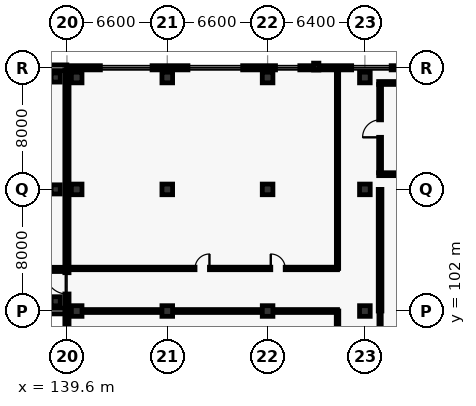
"""IFC4 building model, lengths in metres.
Left out: names, types, materials, properties, quantities, classifications, styles, units other than length and angle.
Written with IfcOpenShell. Run it as: python <this file> out.ifc"""

import sys

from ifc_helpers import new_model, si_unit, direction, frame, frame_2d, origin, origin_2d, place, context, subcontext, project, spatial, rectangle, extrude, element, fill, save


model = new_model("IFC4")
c1 = context("Model", 3, precision=1e-05, world=origin(), true_north=direction((0.0, 1.0)))
c2 = subcontext(c1, "Body", "Model", "MODEL_VIEW")
j1 = project(units=[si_unit("LENGTHUNIT", "METRE"), si_unit("PLANEANGLEUNIT", "RADIAN")], contexts=[c1])
p1 = place(None, origin())
s1 = spatial("IfcSite", under=j1, at=p1, CompositionType="ELEMENT")
p2 = place(p1, origin())
s2 = spatial("IfcBuilding", under=s1, at=p2, CompositionType="ELEMENT")
p3 = place(p2, frame((0.0, 0.0, 5.4)))
s3 = spatial("IfcBuildingStorey", under=s2, at=p3, CompositionType="ELEMENT", Elevation=5.4)
for number, where, z_axis, x_axis in (
    (1, (138.86, 102.64, 0.0), (0.0, 0.0, 1.0), (1.0, 0.0, 0.0)),
    (2, (138.86, 110.0, 0.0), (0.0, 0.0, 1.0), (1.0, 0.0, 0.0)),
    (3, (138.86, 117.36, 0.0), (0.0, 0.0, 1.0), (1.0, 0.0, 0.0)),
):
    element("IfcColumn", number, at=place(p3, frame(where, z_axis=z_axis, x_axis=x_axis)), inside=s3, PredefinedType="COLUMN", context=c2, shape_type="SweptSolid", body=[
        extrude(rectangle(XDim=0.6, YDim=0.6, at=origin_2d()), origin(), (0.0, 0.0, 1.0), 4.8),
    ])
for number, where, z_axis, x_axis in (
    (4, (140.24, 102.0, 0.0), (0.0, 0.0, 1.0), (1.0, 0.0, 0.0)),
    (5, (140.24, 110.0, 0.0), (0.0, 0.0, 1.0), (1.0, 0.0, 0.0)),
    (6, (140.24, 117.36, 0.0), (0.0, 0.0, 1.0), (1.0, 0.0, 0.0)),
    (7, (146.2, 102.0, 0.0), (0.0, 0.0, 1.0), (1.0, 0.0, 0.0)),
    (8, (146.2, 110.0, 0.0), (0.0, 0.0, 1.0), (1.0, 0.0, 0.0)),
    (9, (146.2, 117.36, 0.0), (0.0, 0.0, 1.0), (1.0, 0.0, 0.0)),
    (10, (152.8, 102.0, 0.0), (0.0, 0.0, 1.0), (1.0, 0.0, 0.0)),
    (11, (152.8, 110.0, 0.0), (0.0, 0.0, 1.0), (1.0, 0.0, 0.0)),
    (12, (152.8, 117.36, 0.0), (0.0, 0.0, 1.0), (1.0, 0.0, 0.0)),
    (13, (159.2, 102.0, 0.0), (0.0, 0.0, 1.0), (1.0, 0.0, 0.0)),
    (14, (159.2, 110.0, 0.0), (0.0, 0.0, 1.0), (1.0, 0.0, 0.0)),
    (15, (159.2, 117.36, 0.0), (0.0, 0.0, 1.0), (1.0, 0.0, 0.0)),
):
    element("IfcColumn", number, at=place(p3, frame(where, z_axis=z_axis, x_axis=x_axis)), inside=s3, PredefinedType="COLUMN", context=c2, shape_type="SweptSolid", body=[
        extrude(rectangle(XDim=0.7, YDim=0.7, at=origin_2d()), origin(), (0.0, 0.0, 1.0), 4.8),
    ])
p4 = place(p3, frame((156.0, 118.08, 0.0), z_axis=(0.0, 0.0, 1.0), x_axis=(0.0, 1.0, 0.0)))
e16 = element("IfcColumn", 16, at=p4, inside=s3, PredefinedType="PILASTER", context=c2, shape_type="SweptSolid", body=[
    extrude(rectangle(XDim=0.35, YDim=0.45, at=origin_2d()), origin(), (0.0, 0.0, 1.0), 4.8),
])
p5 = place(p3, frame((94.8, 118.0, 0.0), z_axis=(0.0, 0.0, 1.0), x_axis=(1.0, 0.0, 0.0)))
e17 = element("IfcWall", 17, at=p5, inside=s3, PredefinedType="SOLIDWALL", context=c2, shape_type="SweptSolid", body=[
    extrude(rectangle(XDim=44.795, YDim=0.38, at=frame_2d((22.397, 0.0))), origin(), (0.0, 0.0, 1.0), 4.54),
])
p6 = place(p5, frame((0.75, 0.0, 0.9)))
e18 = element("IfcOpeningElement", 18, at=p6, cuts=e17, PredefinedType="OPENING", context=c2, shape_type="SweptSolid", body=[
    extrude(rectangle(XDim=2.8, YDim=1.8, at=frame_2d((1.4, 0.9))), frame((0.0, 0.2, 0.0), z_axis=(0.0, -1.0, 0.0), x_axis=(1.0, 0.0, 0.0)), (0.0, 0.0, 1.0), 0.4),
])
p7 = place(p5, frame((8.3, 0.0, 0.9)))
e19 = element("IfcOpeningElement", 19, at=p7, cuts=e17, PredefinedType="OPENING", context=c2, shape_type="SweptSolid", body=[
    extrude(rectangle(XDim=3.0, YDim=1.8, at=frame_2d((1.5, 0.9))), frame((0.0, 0.2, 0.0), z_axis=(0.0, -1.0, 0.0), x_axis=(1.0, 0.0, 0.0)), (0.0, 0.0, 1.0), 0.4),
])
p8 = place(p5, frame((15.9, 0.0, 0.9)))
e20 = element("IfcOpeningElement", 20, at=p8, cuts=e17, PredefinedType="OPENING", context=c2, shape_type="SweptSolid", body=[
    extrude(rectangle(XDim=3.2, YDim=1.85, at=frame_2d((1.6, 0.925))), frame((0.0, 0.2, 0.0), z_axis=(0.0, -1.0, 0.0), x_axis=(1.0, 0.0, 0.0)), (0.0, 0.0, 1.0), 0.4),
])
p9 = place(p5, frame((22.75, 0.0, 0.9)))
e21 = element("IfcOpeningElement", 21, at=p9, cuts=e17, PredefinedType="OPENING", context=c2, shape_type="SweptSolid", body=[
    extrude(rectangle(XDim=3.4, YDim=1.85, at=frame_2d((1.7, 0.925))), frame((0.0, 0.2, 0.0), z_axis=(0.0, -1.0, 0.0), x_axis=(1.0, 0.0, 0.0)), (0.0, 0.0, 1.0), 0.4),
])
p10 = place(p5, frame((30.35, 0.0, 0.9)))
e22 = element("IfcOpeningElement", 22, at=p10, cuts=e17, PredefinedType="OPENING", context=c2, shape_type="SweptSolid", body=[
    extrude(rectangle(XDim=3.6, YDim=1.9, at=frame_2d((1.8, 0.95))), frame((0.0, 0.2, 0.0), z_axis=(0.0, -1.0, 0.0), x_axis=(1.0, 0.0, 0.0)), (0.0, 0.0, 1.0), 0.4),
])
p11 = place(p5, frame((36.45, 0.0, 0.9)))
e23 = element("IfcOpeningElement", 23, at=p11, cuts=e17, PredefinedType="OPENING", context=c2, shape_type="SweptSolid", body=[
    extrude(rectangle(XDim=3.8, YDim=1.9, at=frame_2d((1.9, 0.95))), frame((0.0, 0.2, 0.0), z_axis=(0.0, -1.0, 0.0), x_axis=(1.0, 0.0, 0.0)), (0.0, 0.0, 1.0), 0.4),
])
p12 = place(p3, frame((139.5, 102.0, 0.0), z_axis=(0.0, 0.0, 1.0), x_axis=(-1.0, 0.0, 0.0)))
e24 = element("IfcWall", 24, at=p12, inside=s3, PredefinedType="SOLIDWALL", context=c2, shape_type="SweptSolid", body=[
    extrude(rectangle(XDim=44.7, YDim=0.38, at=frame_2d((22.35, 0.0))), origin(), (0.0, 0.0, 1.0), 4.54),
])
p13 = place(p12, frame((2.2, 0.0, 0.9)))
e25 = element("IfcOpeningElement", 25, at=p13, cuts=e24, PredefinedType="OPENING", context=c2, shape_type="SweptSolid", body=[
    extrude(rectangle(XDim=2.6, YDim=2.35, at=frame_2d((1.3, 1.175))), frame((0.0, 0.2, 0.0), z_axis=(0.0, -1.0, 0.0), x_axis=(1.0, 0.0, 0.0)), (0.0, 0.0, 1.0), 0.4),
])
p14 = place(p12, frame((9.05, 0.0, 0.9)))
e26 = element("IfcOpeningElement", 26, at=p14, cuts=e24, PredefinedType="OPENING", context=c2, shape_type="SweptSolid", body=[
    extrude(rectangle(XDim=2.7, YDim=2.35, at=frame_2d((1.35, 1.175))), frame((0.0, 0.2, 0.0), z_axis=(0.0, -1.0, 0.0), x_axis=(1.0, 0.0, 0.0)), (0.0, 0.0, 1.0), 0.4),
])
p15 = place(p12, frame((15.9, 0.0, 0.9)))
e27 = element("IfcOpeningElement", 27, at=p15, cuts=e24, PredefinedType="OPENING", context=c2, shape_type="SweptSolid", body=[
    extrude(rectangle(XDim=2.8, YDim=2.4, at=frame_2d((1.4, 1.2))), frame((0.0, 0.2, 0.0), z_axis=(0.0, -1.0, 0.0), x_axis=(1.0, 0.0, 0.0)), (0.0, 0.0, 1.0), 0.4),
])
p16 = place(p12, frame((22.75, 0.0, 0.9)))
e28 = element("IfcOpeningElement", 28, at=p16, cuts=e24, PredefinedType="OPENING", context=c2, shape_type="SweptSolid", body=[
    extrude(rectangle(XDim=2.9, YDim=2.4, at=frame_2d((1.45, 1.2))), frame((0.0, 0.2, 0.0), z_axis=(0.0, -1.0, 0.0), x_axis=(1.0, 0.0, 0.0)), (0.0, 0.0, 1.0), 0.4),
])
p17 = place(p12, frame((29.6, 0.0, 0.9)))
e29 = element("IfcOpeningElement", 29, at=p17, cuts=e24, PredefinedType="OPENING", context=c2, shape_type="SweptSolid", body=[
    extrude(rectangle(XDim=3.0, YDim=2.45, at=frame_2d((1.5, 1.225))), frame((0.0, 0.2, 0.0), z_axis=(0.0, -1.0, 0.0), x_axis=(1.0, 0.0, 0.0)), (0.0, 0.0, 1.0), 0.4),
])
p18 = place(p12, frame((36.45, 0.0, 0.9)))
e30 = element("IfcOpeningElement", 30, at=p18, cuts=e24, PredefinedType="OPENING", context=c2, shape_type="SweptSolid", body=[
    extrude(rectangle(XDim=3.1, YDim=2.45, at=frame_2d((1.55, 1.225))), frame((0.0, 0.2, 0.0), z_axis=(0.0, -1.0, 0.0), x_axis=(1.0, 0.0, 0.0)), (0.0, 0.0, 1.0), 0.4),
])
p19 = place(p3, frame((139.6, 118.0, 0.0), z_axis=(0.0, 0.0, 1.0), x_axis=(1.0, 0.0, 0.0)))
e31 = element("IfcWall", 31, at=p19, inside=s3, PredefinedType="SOLIDWALL", context=c2, shape_type="SweptSolid", body=[
    extrude(rectangle(XDim=32.4, YDim=0.275, at=frame_2d((16.2, 0.0))), origin(), (0.0, 0.0, 1.0), 4.55),
])
p20 = place(p19, frame((2.2, 0.0, 0.9)))
e32 = element("IfcOpeningElement", 32, at=p20, cuts=e31, PredefinedType="OPENING", context=c2, shape_type="SweptSolid", body=[
    extrude(rectangle(XDim=3.4, YDim=1.85, at=frame_2d((1.7, 0.925))), frame((0.0, 0.147, 0.0), z_axis=(0.0, -1.0, 0.0), x_axis=(1.0, 0.0, 0.0)), (0.0, 0.0, 1.0), 0.295),
])
p21 = place(p19, frame((7.96, 0.0, 0.9)))
e33 = element("IfcOpeningElement", 33, at=p21, cuts=e31, PredefinedType="OPENING", context=c2, shape_type="SweptSolid", body=[
    extrude(rectangle(XDim=3.6, YDim=1.9, at=frame_2d((1.8, 0.95))), frame((0.0, 0.147, 0.0), z_axis=(0.0, -1.0, 0.0), x_axis=(1.0, 0.0, 0.0)), (0.0, 0.0, 1.0), 0.295),
])
p22 = place(p19, frame((13.72, 0.0, 0.9)))
e34 = element("IfcOpeningElement", 34, at=p22, cuts=e31, PredefinedType="OPENING", context=c2, shape_type="SweptSolid", body=[
    extrude(rectangle(XDim=1.6, YDim=1.65, at=frame_2d((0.8, 0.825))), frame((0.0, 0.147, 0.0), z_axis=(0.0, -1.0, 0.0), x_axis=(1.0, 0.0, 0.0)), (0.0, 0.0, 1.0), 0.295),
])
p23 = place(p19, frame((18.73, 0.0, 0.9)))
e35 = element("IfcOpeningElement", 35, at=p23, cuts=e31, PredefinedType="OPENING", context=c2, shape_type="SweptSolid", body=[
    extrude(rectangle(XDim=2.6, YDim=2.35, at=frame_2d((1.3, 1.175))), frame((0.0, 0.147, 0.0), z_axis=(0.0, -1.0, 0.0), x_axis=(1.0, 0.0, 0.0)), (0.0, 0.0, 1.0), 0.295),
])
p24 = place(p3, frame((139.6, 71.74, 0.0), z_axis=(0.0, 0.0, 1.0), x_axis=(0.0, 1.0, 0.0)))
e36 = element("IfcWall", 36, at=p24, inside=s3, PredefinedType="SOLIDWALL", context=c2, shape_type="SweptSolid", body=[
    extrude(rectangle(XDim=46.12, YDim=0.275, at=frame_2d((23.06, 0.0))), origin(), (0.0, 0.0, 1.0), 3.69),
])
p25 = place(p24, frame((31.38, 0.0, 0.0)))
e37 = element("IfcOpeningElement", 37, at=p25, cuts=e36, PredefinedType="OPENING", context=c2, shape_type="SweptSolid", body=[
    extrude(rectangle(XDim=1.4, YDim=2.25, at=frame_2d((0.7, 1.125))), frame((0.0, 0.147, 0.0), z_axis=(0.0, -1.0, 0.0), x_axis=(1.0, 0.0, 0.0)), (0.0, 0.0, 1.0), 0.295),
])
p26 = place(p3, frame((160.105, 111.0, 0.0), z_axis=(0.0, 0.0, 1.0), x_axis=(1.0, 0.0, 0.0)))
e38 = element("IfcWall", 38, at=p26, inside=s3, PredefinedType="PARTITIONING", context=c2, shape_type="SweptSolid", body=[
    extrude(rectangle(XDim=4.495, YDim=0.19, at=frame_2d((2.248, 0.0))), origin(), (0.0, 0.0, 1.0), 4.55),
])
p27 = place(p3, frame((160.105, 117.0, 0.0), z_axis=(0.0, 0.0, 1.0), x_axis=(1.0, 0.0, 0.0)))
e39 = element("IfcWall", 39, at=p27, inside=s3, PredefinedType="PARTITIONING", context=c2, shape_type="SweptSolid", body=[
    extrude(rectangle(XDim=4.143, YDim=0.19, at=frame_2d((2.072, 0.0))), origin(), (0.0, 0.0, 1.0), 3.9),
])
p28 = place(p3, frame((160.2, 111.095, 0.0), z_axis=(0.0, 0.0, 1.0), x_axis=(0.0, 1.0, 0.0)))
e40 = element("IfcWall", 40, at=p28, inside=s3, PredefinedType="PARTITIONING", context=c2, shape_type="SweptSolid", body=[
    extrude(rectangle(XDim=5.81, YDim=0.19, at=frame_2d((2.905, 0.0))), origin(), (0.0, 0.0, 1.0), 4.55),
])
p29 = place(p28, frame((2.33, 0.0, 0.0)))
e41 = element("IfcOpeningElement", 41, at=p29, cuts=e40, PredefinedType="OPENING", context=c2, shape_type="SweptSolid", body=[
    extrude(rectangle(XDim=1.15, YDim=2.2, at=frame_2d((0.575, 1.1))), frame((0.0, 0.105, 0.0), z_axis=(0.0, -1.0, 0.0), x_axis=(1.0, 0.0, 0.0)), (0.0, 0.0, 1.0), 0.21),
])
p30 = place(p3, frame((124.8, 104.8, 0.0), z_axis=(0.0, 0.0, 1.0), x_axis=(1.0, 0.0, 0.0)))
e42 = element("IfcWall", 42, at=p30, inside=s3, PredefinedType="PARTITIONING", context=c2, shape_type="SweptSolid", body=[
    extrude(rectangle(XDim=14.7, YDim=0.15, at=frame_2d((7.35, 0.0))), origin(), (0.0, 0.0, 1.0), 4.54),
])
p31 = place(p30, frame((6.55, 0.0, 0.0)))
e43 = element("IfcOpeningElement", 43, at=p31, cuts=e42, PredefinedType="OPENING", context=c2, shape_type="SweptSolid", body=[
    extrude(rectangle(XDim=1.6, YDim=2.3, at=frame_2d((0.8, 1.15))), frame((0.0, 0.085, 0.0), z_axis=(0.0, -1.0, 0.0), x_axis=(1.0, 0.0, 0.0)), (0.0, 0.0, 1.0), 0.17),
])
p32 = place(p3, frame((157.4, 102.0, 0.0), z_axis=(0.0, 0.0, 1.0), x_axis=(-1.0, 0.0, 0.0)))
e44 = element("IfcWall", 44, at=p32, inside=s3, PredefinedType="PARTITIONING", context=c2, shape_type="SweptSolid", body=[
    extrude(rectangle(XDim=17.8, YDim=0.19, at=frame_2d((8.9, 0.0))), origin(), (0.0, 0.0, 1.0), 3.9),
])
p33 = place(p3, frame((139.6, 104.8, 0.0), z_axis=(0.0, 0.0, 1.0), x_axis=(1.0, 0.0, 0.0)))
e45 = element("IfcWall", 45, at=p33, inside=s3, PredefinedType="PARTITIONING", context=c2, shape_type="SweptSolid", body=[
    extrude(rectangle(XDim=17.8, YDim=0.165, at=frame_2d((8.9, 0.0))), origin(), (0.0, 0.0, 1.0), 4.55),
])
p34 = place(p33, frame((8.425, 0.0, 0.0)))
e46 = element("IfcOpeningElement", 46, at=p34, cuts=e45, PredefinedType="OPENING", context=c2, shape_type="SweptSolid", body=[
    extrude(rectangle(XDim=0.95, YDim=2.1, at=frame_2d((0.475, 1.05))), frame((0.0, 0.093, 0.0), z_axis=(0.0, -1.0, 0.0), x_axis=(1.0, 0.0, 0.0)), (0.0, 0.0, 1.0), 0.185),
])
p35 = place(p33, frame((13.409, 0.0, 0.0)))
e47 = element("IfcOpeningElement", 47, at=p35, cuts=e45, PredefinedType="OPENING", context=c2, shape_type="SweptSolid", body=[
    extrude(rectangle(XDim=0.95, YDim=2.1, at=frame_2d((0.475, 1.05))), frame((0.0, 0.093, 0.0), z_axis=(0.0, -1.0, 0.0), x_axis=(1.0, 0.0, 0.0)), (0.0, 0.0, 1.0), 0.185),
])
p36 = place(p3, frame((157.4, 104.8, 0.0), z_axis=(0.0, 0.0, 1.0), x_axis=(0.0, 1.0, 0.0)))
e48 = element("IfcWall", 48, at=p36, inside=s3, PredefinedType="PARTITIONING", context=c2, shape_type="SweptSolid", body=[
    extrude(rectangle(XDim=13.2, YDim=0.15, at=frame_2d((6.6, 0.0))), origin(), (0.0, 0.0, 1.0), 4.55),
])
p37 = place(p3, frame((160.2, 110.0, 0.0), z_axis=(0.0, 0.0, 1.0), x_axis=(0.0, -1.0, 0.0)))
e49 = element("IfcWall", 49, at=p37, inside=s3, PredefinedType="PARTITIONING", context=c2, shape_type="SweptSolid", body=[
    extrude(rectangle(XDim=8.0, YDim=0.24, at=frame_2d((4.0, 0.0))), origin(), (0.0, 0.0, 1.0), 4.55),
])
p38 = place(p3, frame((157.4, 74.4, 0.0), z_axis=(0.0, 0.0, 1.0), x_axis=(0.0, 1.0, 0.0)))
e50 = element("IfcWall", 50, at=p38, inside=s3, PredefinedType="PARTITIONING", context=c2, shape_type="SweptSolid", body=[
    extrude(rectangle(XDim=27.6, YDim=0.165, at=frame_2d((13.8, 0.0))), origin(), (0.0, 0.0, 1.0), 4.55),
])
p39 = place(p38, frame((13.34, 0.0, 0.0)))
e51 = element("IfcOpeningElement", 51, at=p39, cuts=e50, PredefinedType="OPENING", context=c2, shape_type="SweptSolid", body=[
    extrude(rectangle(XDim=0.92, YDim=2.1, at=frame_2d((0.46, 1.05))), frame((0.0, 0.093, 0.0), z_axis=(0.0, -1.0, 0.0), x_axis=(1.0, 0.0, 0.0)), (0.0, 0.0, 1.0), 0.185),
])
p40 = place(p38, frame((21.068, 0.0, 0.0)))
e52 = element("IfcOpeningElement", 52, at=p40, cuts=e50, PredefinedType="OPENING", context=c2, shape_type="SweptSolid", body=[
    extrude(rectangle(XDim=0.92, YDim=2.1, at=frame_2d((0.46, 1.05))), frame((0.0, 0.093, 0.0), z_axis=(0.0, -1.0, 0.0), x_axis=(1.0, 0.0, 0.0)), (0.0, 0.0, 1.0), 0.185),
])
p41 = place(p3, frame((160.2, 102.0, 0.0), z_axis=(0.0, 0.0, 1.0), x_axis=(0.0, -1.0, 0.0)))
e53 = element("IfcWall", 53, at=p41, inside=s3, PredefinedType="PARTITIONING", context=c2, shape_type="SweptSolid", body=[
    extrude(rectangle(XDim=22.4, YDim=0.15, at=frame_2d((11.2, 0.0))), origin(), (0.0, 0.0, 1.0), 4.55),
])
p42 = place(p41, frame((10.69, 0.0, 0.0)))
e54 = element("IfcOpeningElement", 54, at=p42, cuts=e53, PredefinedType="OPENING", context=c2, shape_type="SweptSolid", body=[
    extrude(rectangle(XDim=1.02, YDim=2.1, at=frame_2d((0.51, 1.05))), frame((0.0, 0.085, 0.0), z_axis=(0.0, -1.0, 0.0), x_axis=(1.0, 0.0, 0.0)), (0.0, 0.0, 1.0), 0.17),
])
p43 = place(p41, frame((16.962, 0.0, 0.0)))
e55 = element("IfcOpeningElement", 55, at=p43, cuts=e53, PredefinedType="OPENING", context=c2, shape_type="SweptSolid", body=[
    extrude(rectangle(XDim=1.02, YDim=2.1, at=frame_2d((0.51, 1.05))), frame((0.0, 0.085, 0.0), z_axis=(0.0, -1.0, 0.0), x_axis=(1.0, 0.0, 0.0)), (0.0, 0.0, 1.0), 0.17),
])
p44 = place(p20, origin())
e56 = element("IfcWindow", 56, at=p44, inside=s3, PartitioningType="SINGLE_PANEL", PredefinedType="WINDOW", context=c2, shape_type="SweptSolid", body=[
    extrude(rectangle(XDim=3.4, YDim=1.85, at=frame_2d((1.7, 0.925))), frame((0.0, 0.03, 0.0), z_axis=(0.0, -1.0, 0.0), x_axis=(1.0, 0.0, 0.0)), (0.0, 0.0, 1.0), 0.06),
])
fill(e32, e56)
p45 = place(p21, origin())
e57 = element("IfcWindow", 57, at=p45, inside=s3, PartitioningType="SINGLE_PANEL", PredefinedType="WINDOW", context=c2, shape_type="SweptSolid", body=[
    extrude(rectangle(XDim=3.6, YDim=1.9, at=frame_2d((1.8, 0.95))), frame((0.0, 0.03, 0.0), z_axis=(0.0, -1.0, 0.0), x_axis=(1.0, 0.0, 0.0)), (0.0, 0.0, 1.0), 0.06),
])
fill(e33, e57)
p46 = place(p22, origin())
e58 = element("IfcWindow", 58, at=p46, inside=s3, PartitioningType="SINGLE_PANEL", PredefinedType="WINDOW", context=c2, shape_type="SweptSolid", body=[
    extrude(rectangle(XDim=1.6, YDim=1.65, at=frame_2d((0.8, 0.825))), frame((0.0, 0.03, 0.0), z_axis=(0.0, -1.0, 0.0), x_axis=(1.0, 0.0, 0.0)), (0.0, 0.0, 1.0), 0.06),
])
fill(e34, e58)
p47 = place(p23, origin())
e59 = element("IfcWindow", 59, at=p47, inside=s3, PartitioningType="SINGLE_PANEL", PredefinedType="WINDOW", context=c2, shape_type="SweptSolid", body=[
    extrude(rectangle(XDim=2.6, YDim=2.35, at=frame_2d((1.3, 1.175))), frame((0.0, 0.03, 0.0), z_axis=(0.0, -1.0, 0.0), x_axis=(1.0, 0.0, 0.0)), (0.0, 0.0, 1.0), 0.06),
])
fill(e35, e59)
p48 = place(p29, origin())
e60 = element("IfcDoor", 60, at=p48, inside=s3, OperationType="SINGLE_SWING_LEFT", PredefinedType="DOOR", context=c2, shape_type="SweptSolid", body=[
    extrude(rectangle(XDim=1.15, YDim=2.2, at=frame_2d((0.575, 1.1))), frame((0.0, 0.025, 0.0), z_axis=(0.0, -1.0, 0.0), x_axis=(1.0, 0.0, 0.0)), (0.0, 0.0, 1.0), 0.05),
])
fill(e41, e60)
p49 = place(p25, origin())
e61 = element("IfcDoor", 61, at=p49, inside=s3, OperationType="SINGLE_SWING_RIGHT", PredefinedType="DOOR", context=c2, shape_type="SweptSolid", body=[
    extrude(rectangle(XDim=1.4, YDim=2.25, at=frame_2d((0.7, 1.125))), frame((0.0, 0.025, 0.0), z_axis=(0.0, -1.0, 0.0), x_axis=(1.0, 0.0, 0.0)), (0.0, 0.0, 1.0), 0.05),
])
fill(e37, e61)
p50 = place(p34, origin())
e62 = element("IfcDoor", 62, at=p50, inside=s3, OperationType="SINGLE_SWING_RIGHT", PredefinedType="DOOR", context=c2, shape_type="SweptSolid", body=[
    extrude(rectangle(XDim=0.95, YDim=2.1, at=frame_2d((0.475, 1.05))), frame((0.0, 0.025, 0.0), z_axis=(0.0, -1.0, 0.0), x_axis=(1.0, 0.0, 0.0)), (0.0, 0.0, 1.0), 0.05),
])
fill(e46, e62)
p51 = place(p35, origin())
e63 = element("IfcDoor", 63, at=p51, inside=s3, OperationType="SINGLE_SWING_LEFT", PredefinedType="DOOR", context=c2, shape_type="SweptSolid", body=[
    extrude(rectangle(XDim=0.95, YDim=2.1, at=frame_2d((0.475, 1.05))), frame((0.0, 0.025, 0.0), z_axis=(0.0, -1.0, 0.0), x_axis=(1.0, 0.0, 0.0)), (0.0, 0.0, 1.0), 0.05),
])
fill(e47, e63)
save(model, sys.argv[1])
